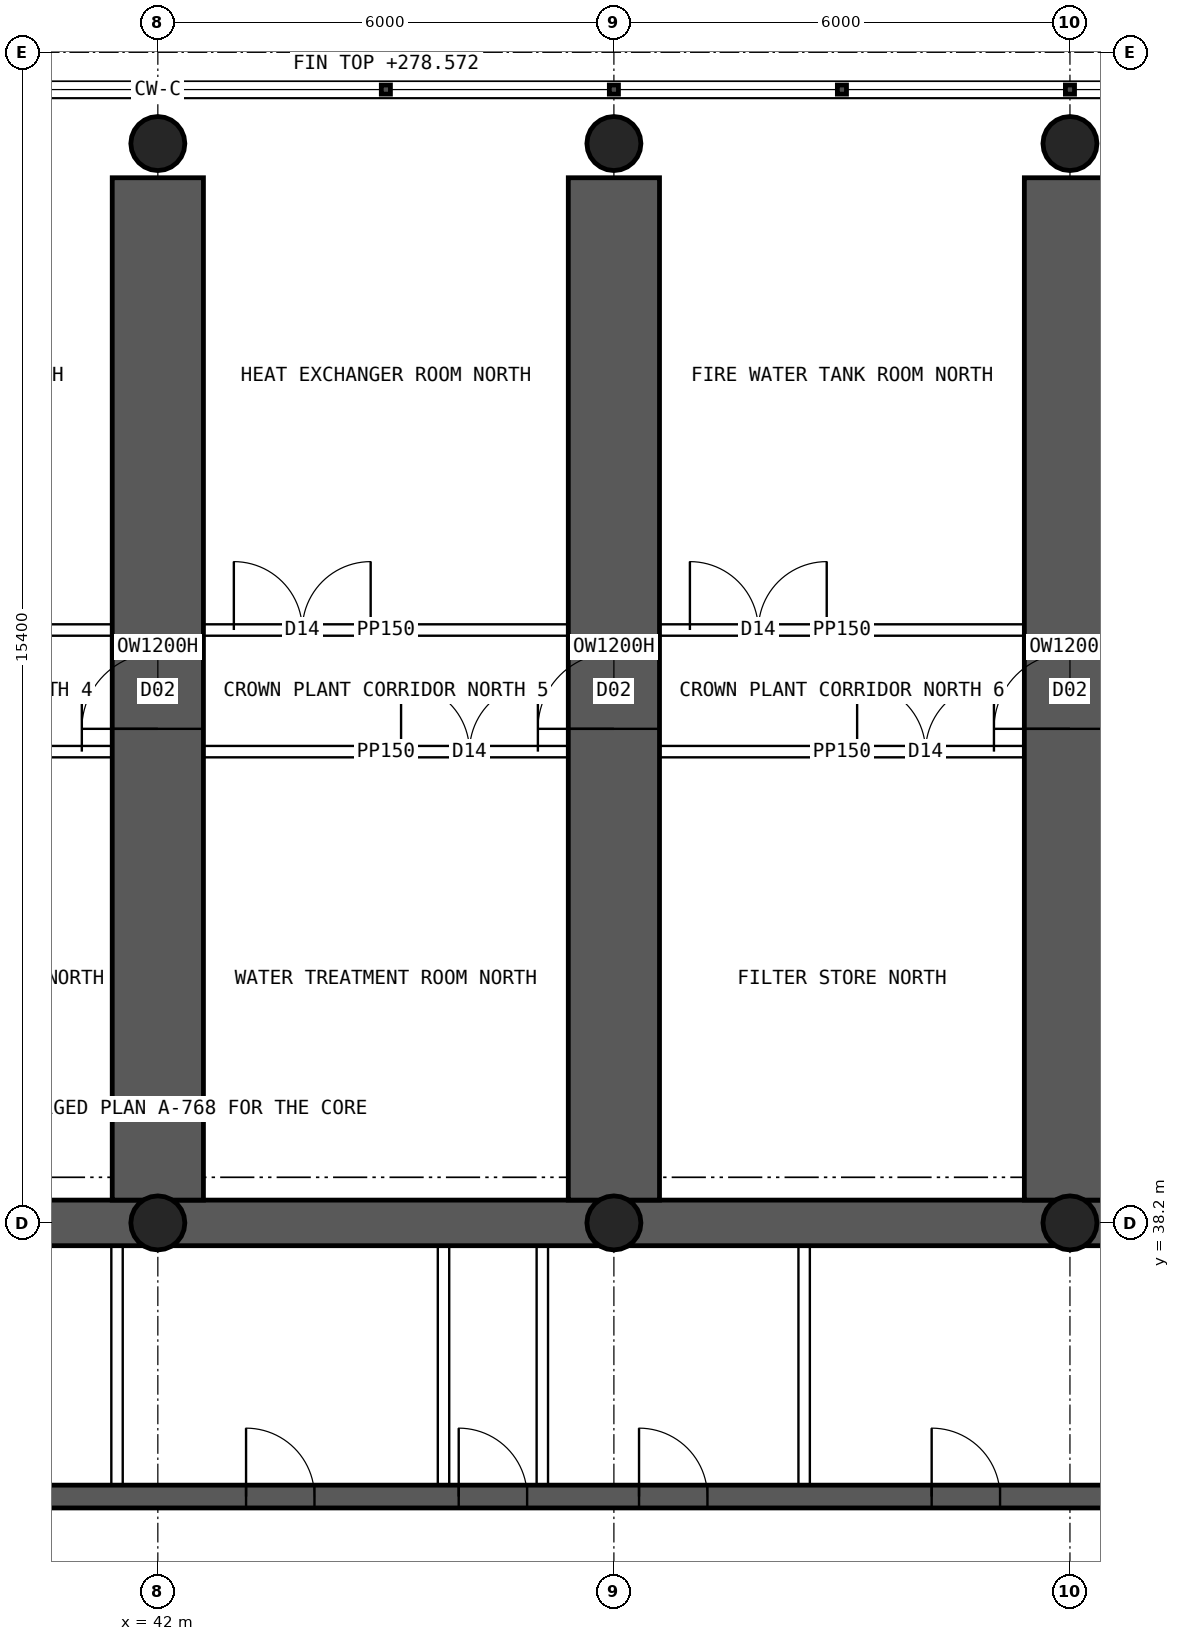
"""IFC4 building model, lengths in metres.
Left out: names, types, materials, properties, quantities, classifications, styles, units other than length and angle.
Written with IfcOpenShell. Run it as: python <this file> out.ifc"""

import sys

from ifc_helpers import new_model, si_unit, direction, frame, frame_2d, origin, origin_2d, place, context, subcontext, project, spatial, rectangle, hollow_circle, extrude, element, fill, save


model = new_model("IFC4")
c1 = context("Model", 3, precision=1e-05, world=origin(), true_north=direction((0.0, 1.0)))
c2 = subcontext(c1, "Body", "Model", "MODEL_VIEW")
j1 = project(units=[si_unit("LENGTHUNIT", "METRE"), si_unit("PLANEANGLEUNIT", "RADIAN")], contexts=[c1])
p1 = place(None, origin())
s1 = spatial("IfcSite", under=j1, at=p1, CompositionType="ELEMENT")
p2 = place(p1, origin())
s2 = spatial("IfcBuilding", under=s1, at=p2, CompositionType="ELEMENT")
p3 = place(p2, frame((0.0, 0.0, 262.3)))
s3 = spatial("IfcBuildingStorey", under=s2, at=p3, CompositionType="ELEMENT", Elevation=262.3)
p4 = place(p3, frame((18.0, 38.2, 0.0), z_axis=(0.0, 0.0, 1.0), x_axis=(1.0, 0.0, 0.0)))
e1 = element("IfcWall", 1, at=p4, inside=s3, PredefinedType="SHEAR", context=c2, shape_type="SweptSolid", body=[
    extrude(rectangle(XDim=48.0, YDim=0.6, at=frame_2d((24.0, 0.0))), origin(), (0.0, 0.0, 1.0), 6.0),
])
p5 = place(p3, frame((18.3, 34.6, 0.0), z_axis=(0.0, 0.0, 1.0), x_axis=(1.0, 0.0, 0.0)))
e2 = element("IfcWall", 2, at=p5, inside=s3, PredefinedType="SHEAR", context=c2, shape_type="SweptSolid", body=[
    extrude(rectangle(XDim=47.4, YDim=0.3, at=frame_2d((23.7, 0.0))), origin(), (0.0, 0.0, 1.0), 6.0),
])
p6 = place(p5, frame((0.9, 0.0, 0.0)))
e3 = element("IfcOpeningElement", 3, at=p6, cuts=e2, PredefinedType="OPENING", context=c2, shape_type="SweptSolid", body=[
    extrude(rectangle(XDim=1.1, YDim=2.1, at=frame_2d((0.55, 1.05))), frame((0.0, 0.16, 0.0), z_axis=(0.0, -1.0, 0.0), x_axis=(1.0, 0.0, 0.0)), (0.0, 0.0, 1.0), 0.32),
])
p7 = place(p5, frame((45.4, 0.0, 0.0)))
e4 = element("IfcOpeningElement", 4, at=p7, cuts=e2, PredefinedType="OPENING", context=c2, shape_type="SweptSolid", body=[
    extrude(rectangle(XDim=1.1, YDim=2.1, at=frame_2d((0.55, 1.05))), frame((0.0, 0.16, 0.0), z_axis=(0.0, -1.0, 0.0), x_axis=(1.0, 0.0, 0.0)), (0.0, 0.0, 1.0), 0.32),
])
p8 = place(p5, frame((4.3, 0.0, 0.0)))
e5 = element("IfcOpeningElement", 5, at=p8, cuts=e2, PredefinedType="OPENING", context=c2, shape_type="SweptSolid", body=[
    extrude(rectangle(XDim=0.9, YDim=2.1, at=frame_2d((0.45, 1.05))), frame((0.0, 0.16, 0.0), z_axis=(0.0, -1.0, 0.0), x_axis=(1.0, 0.0, 0.0)), (0.0, 0.0, 1.0), 0.32),
])
p9 = place(p5, frame((42.2, 0.0, 0.0)))
e6 = element("IfcOpeningElement", 6, at=p9, cuts=e2, PredefinedType="OPENING", context=c2, shape_type="SweptSolid", body=[
    extrude(rectangle(XDim=0.9, YDim=2.1, at=frame_2d((0.45, 1.05))), frame((0.0, 0.16, 0.0), z_axis=(0.0, -1.0, 0.0), x_axis=(1.0, 0.0, 0.0)), (0.0, 0.0, 1.0), 0.32),
])
p10 = place(p5, frame((9.075, 0.0, 0.0)))
e7 = element("IfcOpeningElement", 7, at=p10, cuts=e2, PredefinedType="OPENING", context=c2, shape_type="SweptSolid", body=[
    extrude(rectangle(XDim=0.9, YDim=2.1, at=frame_2d((0.45, 1.05))), frame((0.0, 0.16, 0.0), z_axis=(0.0, -1.0, 0.0), x_axis=(1.0, 0.0, 0.0)), (0.0, 0.0, 1.0), 0.32),
])
p11 = place(p5, frame((13.049, 0.0, 0.0)))
e8 = element("IfcOpeningElement", 8, at=p11, cuts=e2, PredefinedType="OPENING", context=c2, shape_type="SweptSolid", body=[
    extrude(rectangle(XDim=0.9, YDim=2.1, at=frame_2d((0.45, 1.05))), frame((0.0, 0.16, 0.0), z_axis=(0.0, -1.0, 0.0), x_axis=(1.0, 0.0, 0.0)), (0.0, 0.0, 1.0), 0.32),
])
p12 = place(p5, frame((16.696, 0.0, 0.0)))
e9 = element("IfcOpeningElement", 9, at=p12, cuts=e2, PredefinedType="OPENING", context=c2, shape_type="SweptSolid", body=[
    extrude(rectangle(XDim=0.9, YDim=2.1, at=frame_2d((0.45, 1.05))), frame((0.0, 0.16, 0.0), z_axis=(0.0, -1.0, 0.0), x_axis=(1.0, 0.0, 0.0)), (0.0, 0.0, 1.0), 0.32),
])
p13 = place(p5, frame((20.455, 0.0, 0.0)))
e10 = element("IfcOpeningElement", 10, at=p13, cuts=e2, PredefinedType="OPENING", context=c2, shape_type="SweptSolid", body=[
    extrude(rectangle(XDim=0.9, YDim=2.1, at=frame_2d((0.45, 1.05))), frame((0.0, 0.16, 0.0), z_axis=(0.0, -1.0, 0.0), x_axis=(1.0, 0.0, 0.0)), (0.0, 0.0, 1.0), 0.32),
])
p14 = place(p5, frame((24.861, 0.0, 0.0)))
e11 = element("IfcOpeningElement", 11, at=p14, cuts=e2, PredefinedType="OPENING", context=c2, shape_type="SweptSolid", body=[
    extrude(rectangle(XDim=0.9, YDim=2.1, at=frame_2d((0.45, 1.05))), frame((0.0, 0.16, 0.0), z_axis=(0.0, -1.0, 0.0), x_axis=(1.0, 0.0, 0.0)), (0.0, 0.0, 1.0), 0.32),
])
p15 = place(p5, frame((27.658, 0.0, 0.0)))
e12 = element("IfcOpeningElement", 12, at=p15, cuts=e2, PredefinedType="OPENING", context=c2, shape_type="SweptSolid", body=[
    extrude(rectangle(XDim=0.9, YDim=2.1, at=frame_2d((0.45, 1.05))), frame((0.0, 0.16, 0.0), z_axis=(0.0, -1.0, 0.0), x_axis=(1.0, 0.0, 0.0)), (0.0, 0.0, 1.0), 0.32),
])
p16 = place(p5, frame((30.031, 0.0, 0.0)))
e13 = element("IfcOpeningElement", 13, at=p16, cuts=e2, PredefinedType="OPENING", context=c2, shape_type="SweptSolid", body=[
    extrude(rectangle(XDim=0.9, YDim=2.1, at=frame_2d((0.45, 1.05))), frame((0.0, 0.16, 0.0), z_axis=(0.0, -1.0, 0.0), x_axis=(1.0, 0.0, 0.0)), (0.0, 0.0, 1.0), 0.32),
])
p17 = place(p5, frame((33.881, 0.0, 0.0)))
e14 = element("IfcOpeningElement", 14, at=p17, cuts=e2, PredefinedType="OPENING", context=c2, shape_type="SweptSolid", body=[
    extrude(rectangle(XDim=0.9, YDim=2.1, at=frame_2d((0.45, 1.05))), frame((0.0, 0.16, 0.0), z_axis=(0.0, -1.0, 0.0), x_axis=(1.0, 0.0, 0.0)), (0.0, 0.0, 1.0), 0.32),
])
p18 = place(p5, frame((37.629, 0.0, 0.0)))
e15 = element("IfcOpeningElement", 15, at=p18, cuts=e2, PredefinedType="OPENING", context=c2, shape_type="SweptSolid", body=[
    extrude(rectangle(XDim=0.9, YDim=2.1, at=frame_2d((0.45, 1.05))), frame((0.0, 0.16, 0.0), z_axis=(0.0, -1.0, 0.0), x_axis=(1.0, 0.0, 0.0)), (0.0, 0.0, 1.0), 0.32),
])
p19 = place(p3, frame((42.0, 38.5, 0.0), z_axis=(0.0, 0.0, 1.0), x_axis=(0.0, 1.0, 0.0)))
e16 = element("IfcWall", 16, at=p19, inside=s3, PredefinedType="SHEAR", context=c2, shape_type="SweptSolid", body=[
    extrude(rectangle(XDim=13.45, YDim=1.2, at=frame_2d((6.725, 0.0))), origin(), (0.0, 0.0, 1.0), 4.4),
])
p20 = place(p19, frame((6.2, 0.0, 0.0)))
e17 = element("IfcOpeningElement", 17, at=p20, cuts=e16, PredefinedType="OPENING", context=c2, shape_type="SweptSolid", body=[
    extrude(rectangle(XDim=1.0, YDim=2.1, at=frame_2d((0.5, 1.05))), frame((0.0, 0.61, 0.0), z_axis=(0.0, -1.0, 0.0), x_axis=(1.0, 0.0, 0.0)), (0.0, 0.0, 1.0), 1.22),
])
p21 = place(p3, frame((48.0, 38.5, 0.0), z_axis=(0.0, 0.0, 1.0), x_axis=(0.0, 1.0, 0.0)))
e18 = element("IfcWall", 18, at=p21, inside=s3, PredefinedType="SHEAR", context=c2, shape_type="SweptSolid", body=[
    extrude(rectangle(XDim=13.45, YDim=1.2, at=frame_2d((6.725, 0.0))), origin(), (0.0, 0.0, 1.0), 4.4),
])
p22 = place(p21, frame((6.2, 0.0, 0.0)))
e19 = element("IfcOpeningElement", 19, at=p22, cuts=e18, PredefinedType="OPENING", context=c2, shape_type="SweptSolid", body=[
    extrude(rectangle(XDim=1.0, YDim=2.1, at=frame_2d((0.5, 1.05))), frame((0.0, 0.61, 0.0), z_axis=(0.0, -1.0, 0.0), x_axis=(1.0, 0.0, 0.0)), (0.0, 0.0, 1.0), 1.22),
])
p23 = place(p3, frame((54.0, 38.5, 0.0), z_axis=(0.0, 0.0, 1.0), x_axis=(0.0, 1.0, 0.0)))
e20 = element("IfcWall", 20, at=p23, inside=s3, PredefinedType="SHEAR", context=c2, shape_type="SweptSolid", body=[
    extrude(rectangle(XDim=13.45, YDim=1.2, at=frame_2d((6.725, 0.0))), origin(), (0.0, 0.0, 1.0), 4.4),
])
p24 = place(p23, frame((6.2, 0.0, 0.0)))
e21 = element("IfcOpeningElement", 21, at=p24, cuts=e20, PredefinedType="OPENING", context=c2, shape_type="SweptSolid", body=[
    extrude(rectangle(XDim=1.0, YDim=2.1, at=frame_2d((0.5, 1.05))), frame((0.0, 0.61, 0.0), z_axis=(0.0, -1.0, 0.0), x_axis=(1.0, 0.0, 0.0)), (0.0, 0.0, 1.0), 1.22),
])
p25 = place(p3, frame((42.0, 38.2, 0.0), z_axis=(0.0, 0.0, 1.0), x_axis=(1.0, 0.0, 0.0)))
e22 = element("IfcColumn", 22, at=p25, inside=s3, PredefinedType="COLUMN", context=c2, shape_type="SweptSolid", body=[
    extrude(hollow_circle(Radius=0.355, WallThickness=0.025, at=origin_2d()), origin(), (0.0, 0.0, 1.0), 11.517),
])
p26 = place(p3, frame((42.0, 52.4, 0.0), z_axis=(0.0, 0.0, 1.0), x_axis=(1.0, 0.0, 0.0)))
e23 = element("IfcColumn", 23, at=p26, inside=s3, PredefinedType="COLUMN", context=c2, shape_type="SweptSolid", body=[
    extrude(hollow_circle(Radius=0.355, WallThickness=0.025, at=origin_2d()), origin(), (0.0, 0.0, 1.0), 15.058),
])
p27 = place(p3, frame((48.0, 38.2, 0.0), z_axis=(0.0, 0.0, 1.0), x_axis=(1.0, 0.0, 0.0)))
e24 = element("IfcColumn", 24, at=p27, inside=s3, PredefinedType="COLUMN", context=c2, shape_type="SweptSolid", body=[
    extrude(hollow_circle(Radius=0.355, WallThickness=0.025, at=origin_2d()), origin(), (0.0, 0.0, 1.0), 11.517),
])
p28 = place(p3, frame((48.0, 52.4, 0.0), z_axis=(0.0, 0.0, 1.0), x_axis=(1.0, 0.0, 0.0)))
e25 = element("IfcColumn", 25, at=p28, inside=s3, PredefinedType="COLUMN", context=c2, shape_type="SweptSolid", body=[
    extrude(hollow_circle(Radius=0.355, WallThickness=0.025, at=origin_2d()), origin(), (0.0, 0.0, 1.0), 15.058),
])
p29 = place(p3, frame((54.0, 38.2, 0.0), z_axis=(0.0, 0.0, 1.0), x_axis=(1.0, 0.0, 0.0)))
e26 = element("IfcColumn", 26, at=p29, inside=s3, PredefinedType="COLUMN", context=c2, shape_type="SweptSolid", body=[
    extrude(hollow_circle(Radius=0.355, WallThickness=0.025, at=origin_2d()), origin(), (0.0, 0.0, 1.0), 11.517),
])
p30 = place(p3, frame((54.0, 52.4, 0.0), z_axis=(0.0, 0.0, 1.0), x_axis=(1.0, 0.0, 0.0)))
e27 = element("IfcColumn", 27, at=p30, inside=s3, PredefinedType="COLUMN", context=c2, shape_type="SweptSolid", body=[
    extrude(hollow_circle(Radius=0.355, WallThickness=0.025, at=origin_2d()), origin(), (0.0, 0.0, 1.0), 15.058),
])
for number, where, z_axis, x_axis in (
    (28, (41.463, 34.75, 0.0), (0.0, 0.0, 1.0), (0.0, 1.0, 0.0)),
    (29, (45.758, 34.75, 0.0), (0.0, 0.0, 1.0), (0.0, 1.0, 0.0)),
    (30, (47.058, 34.75, 0.0), (0.0, 0.0, 1.0), (0.0, 1.0, 0.0)),
    (31, (50.503, 34.75, 0.0), (0.0, 0.0, 1.0), (0.0, 1.0, 0.0)),
):
    element("IfcWall", number, at=place(p3, frame(where, z_axis=z_axis, x_axis=x_axis)), inside=s3, PredefinedType="SOLIDWALL", context=c2, shape_type="SweptSolid", body=[
        extrude(rectangle(XDim=3.15, YDim=0.15, at=frame_2d((1.575, 0.0))), origin(), (0.0, 0.0, 1.0), 6.0),
    ])
p31 = place(p3, frame((36.6, 46.0, 0.0), z_axis=(0.0, 0.0, 1.0), x_axis=(1.0, 0.0, 0.0)))
e32 = element("IfcWall", 32, at=p31, inside=s3, PredefinedType="PARTITIONING", context=c2, shape_type="SweptSolid", body=[
    extrude(rectangle(XDim=4.8, YDim=0.15, at=frame_2d((2.4, 0.0))), origin(), (0.0, 0.0, 1.0), 6.0),
])
p32 = place(p31, frame((0.4, 0.0, 0.0)))
e33 = element("IfcOpeningElement", 33, at=p32, cuts=e32, PredefinedType="OPENING", context=c2, shape_type="SweptSolid", body=[
    extrude(rectangle(XDim=1.8, YDim=2.4, at=frame_2d((0.9, 1.2))), frame((0.0, 0.085, 0.0), z_axis=(0.0, -1.0, 0.0), x_axis=(1.0, 0.0, 0.0)), (0.0, 0.0, 1.0), 0.17),
])
p33 = place(p3, frame((36.6, 44.4, 0.0), z_axis=(0.0, 0.0, 1.0), x_axis=(1.0, 0.0, 0.0)))
e34 = element("IfcWall", 34, at=p33, inside=s3, PredefinedType="PARTITIONING", context=c2, shape_type="SweptSolid", body=[
    extrude(rectangle(XDim=4.8, YDim=0.15, at=frame_2d((2.4, 0.0))), origin(), (0.0, 0.0, 1.0), 6.0),
])
p34 = place(p33, frame((2.6, 0.0, 0.0)))
e35 = element("IfcOpeningElement", 35, at=p34, cuts=e34, PredefinedType="OPENING", context=c2, shape_type="SweptSolid", body=[
    extrude(rectangle(XDim=1.8, YDim=2.4, at=frame_2d((0.9, 1.2))), frame((0.0, 0.085, 0.0), z_axis=(0.0, -1.0, 0.0), x_axis=(1.0, 0.0, 0.0)), (0.0, 0.0, 1.0), 0.17),
])
p35 = place(p3, frame((42.6, 46.0, 0.0), z_axis=(0.0, 0.0, 1.0), x_axis=(1.0, 0.0, 0.0)))
e36 = element("IfcWall", 36, at=p35, inside=s3, PredefinedType="PARTITIONING", context=c2, shape_type="SweptSolid", body=[
    extrude(rectangle(XDim=4.8, YDim=0.15, at=frame_2d((2.4, 0.0))), origin(), (0.0, 0.0, 1.0), 6.0),
])
p36 = place(p35, frame((0.4, 0.0, 0.0)))
e37 = element("IfcOpeningElement", 37, at=p36, cuts=e36, PredefinedType="OPENING", context=c2, shape_type="SweptSolid", body=[
    extrude(rectangle(XDim=1.8, YDim=2.4, at=frame_2d((0.9, 1.2))), frame((0.0, 0.085, 0.0), z_axis=(0.0, -1.0, 0.0), x_axis=(1.0, 0.0, 0.0)), (0.0, 0.0, 1.0), 0.17),
])
p37 = place(p3, frame((42.6, 44.4, 0.0), z_axis=(0.0, 0.0, 1.0), x_axis=(1.0, 0.0, 0.0)))
e38 = element("IfcWall", 38, at=p37, inside=s3, PredefinedType="PARTITIONING", context=c2, shape_type="SweptSolid", body=[
    extrude(rectangle(XDim=4.8, YDim=0.15, at=frame_2d((2.4, 0.0))), origin(), (0.0, 0.0, 1.0), 6.0),
])
p38 = place(p37, frame((2.6, 0.0, 0.0)))
e39 = element("IfcOpeningElement", 39, at=p38, cuts=e38, PredefinedType="OPENING", context=c2, shape_type="SweptSolid", body=[
    extrude(rectangle(XDim=1.8, YDim=2.4, at=frame_2d((0.9, 1.2))), frame((0.0, 0.085, 0.0), z_axis=(0.0, -1.0, 0.0), x_axis=(1.0, 0.0, 0.0)), (0.0, 0.0, 1.0), 0.17),
])
p39 = place(p3, frame((48.6, 46.0, 0.0), z_axis=(0.0, 0.0, 1.0), x_axis=(1.0, 0.0, 0.0)))
e40 = element("IfcWall", 40, at=p39, inside=s3, PredefinedType="PARTITIONING", context=c2, shape_type="SweptSolid", body=[
    extrude(rectangle(XDim=4.8, YDim=0.15, at=frame_2d((2.4, 0.0))), origin(), (0.0, 0.0, 1.0), 6.0),
])
p40 = place(p39, frame((0.4, 0.0, 0.0)))
e41 = element("IfcOpeningElement", 41, at=p40, cuts=e40, PredefinedType="OPENING", context=c2, shape_type="SweptSolid", body=[
    extrude(rectangle(XDim=1.8, YDim=2.4, at=frame_2d((0.9, 1.2))), frame((0.0, 0.085, 0.0), z_axis=(0.0, -1.0, 0.0), x_axis=(1.0, 0.0, 0.0)), (0.0, 0.0, 1.0), 0.17),
])
p41 = place(p3, frame((48.6, 44.4, 0.0), z_axis=(0.0, 0.0, 1.0), x_axis=(1.0, 0.0, 0.0)))
e42 = element("IfcWall", 42, at=p41, inside=s3, PredefinedType="PARTITIONING", context=c2, shape_type="SweptSolid", body=[
    extrude(rectangle(XDim=4.8, YDim=0.15, at=frame_2d((2.4, 0.0))), origin(), (0.0, 0.0, 1.0), 6.0),
])
p42 = place(p41, frame((2.6, 0.0, 0.0)))
e43 = element("IfcOpeningElement", 43, at=p42, cuts=e42, PredefinedType="OPENING", context=c2, shape_type="SweptSolid", body=[
    extrude(rectangle(XDim=1.8, YDim=2.4, at=frame_2d((0.9, 1.2))), frame((0.0, 0.085, 0.0), z_axis=(0.0, -1.0, 0.0), x_axis=(1.0, 0.0, 0.0)), (0.0, 0.0, 1.0), 0.17),
])
p43 = place(p14, origin())
e44 = element("IfcDoor", 44, at=p43, inside=s3, OperationType="SINGLE_SWING_LEFT", PredefinedType="DOOR", context=c2, shape_type="SweptSolid", body=[
    extrude(rectangle(XDim=0.9, YDim=2.1, at=frame_2d((0.45, 1.05))), frame((0.0, 0.025, 0.0), z_axis=(0.0, -1.0, 0.0), x_axis=(1.0, 0.0, 0.0)), (0.0, 0.0, 1.0), 0.05),
])
fill(e11, e44)
p44 = place(p15, origin())
e45 = element("IfcDoor", 45, at=p44, inside=s3, OperationType="SINGLE_SWING_LEFT", PredefinedType="DOOR", context=c2, shape_type="SweptSolid", body=[
    extrude(rectangle(XDim=0.9, YDim=2.1, at=frame_2d((0.45, 1.05))), frame((0.0, 0.025, 0.0), z_axis=(0.0, -1.0, 0.0), x_axis=(1.0, 0.0, 0.0)), (0.0, 0.0, 1.0), 0.05),
])
fill(e12, e45)
p45 = place(p16, origin())
e46 = element("IfcDoor", 46, at=p45, inside=s3, OperationType="SINGLE_SWING_LEFT", PredefinedType="DOOR", context=c2, shape_type="SweptSolid", body=[
    extrude(rectangle(XDim=0.9, YDim=2.1, at=frame_2d((0.45, 1.05))), frame((0.0, 0.025, 0.0), z_axis=(0.0, -1.0, 0.0), x_axis=(1.0, 0.0, 0.0)), (0.0, 0.0, 1.0), 0.05),
])
fill(e13, e46)
p46 = place(p17, origin())
e47 = element("IfcDoor", 47, at=p46, inside=s3, OperationType="SINGLE_SWING_LEFT", PredefinedType="DOOR", context=c2, shape_type="SweptSolid", body=[
    extrude(rectangle(XDim=0.9, YDim=2.1, at=frame_2d((0.45, 1.05))), frame((0.0, 0.025, 0.0), z_axis=(0.0, -1.0, 0.0), x_axis=(1.0, 0.0, 0.0)), (0.0, 0.0, 1.0), 0.05),
])
fill(e14, e47)
p47 = place(p20, origin())
e48 = element("IfcDoor", 48, at=p47, inside=s3, OperationType="SINGLE_SWING_LEFT", PredefinedType="DOOR", context=c2, shape_type="SweptSolid", body=[
    extrude(rectangle(XDim=1.0, YDim=2.1, at=frame_2d((0.5, 1.05))), frame((0.0, 0.025, 0.0), z_axis=(0.0, -1.0, 0.0), x_axis=(1.0, 0.0, 0.0)), (0.0, 0.0, 1.0), 0.05),
])
fill(e17, e48)
p48 = place(p22, origin())
e49 = element("IfcDoor", 49, at=p48, inside=s3, OperationType="SINGLE_SWING_LEFT", PredefinedType="DOOR", context=c2, shape_type="SweptSolid", body=[
    extrude(rectangle(XDim=1.0, YDim=2.1, at=frame_2d((0.5, 1.05))), frame((0.0, 0.025, 0.0), z_axis=(0.0, -1.0, 0.0), x_axis=(1.0, 0.0, 0.0)), (0.0, 0.0, 1.0), 0.05),
])
fill(e19, e49)
p49 = place(p24, origin())
e50 = element("IfcDoor", 50, at=p49, inside=s3, OperationType="SINGLE_SWING_LEFT", PredefinedType="DOOR", context=c2, shape_type="SweptSolid", body=[
    extrude(rectangle(XDim=1.0, YDim=2.1, at=frame_2d((0.5, 1.05))), frame((0.0, 0.025, 0.0), z_axis=(0.0, -1.0, 0.0), x_axis=(1.0, 0.0, 0.0)), (0.0, 0.0, 1.0), 0.05),
])
fill(e21, e50)
p50 = place(p34, origin())
e51 = element("IfcDoor", 51, at=p50, inside=s3, OperationType="DOUBLE_DOOR_SINGLE_SWING", PredefinedType="DOOR", context=c2, shape_type="SweptSolid", body=[
    extrude(rectangle(XDim=1.8, YDim=2.4, at=frame_2d((0.9, 1.2))), frame((0.0, 0.025, 0.0), z_axis=(0.0, -1.0, 0.0), x_axis=(1.0, 0.0, 0.0)), (0.0, 0.0, 1.0), 0.05),
])
fill(e35, e51)
p51 = place(p36, origin())
e52 = element("IfcDoor", 52, at=p51, inside=s3, OperationType="DOUBLE_DOOR_SINGLE_SWING", PredefinedType="DOOR", context=c2, shape_type="SweptSolid", body=[
    extrude(rectangle(XDim=1.8, YDim=2.4, at=frame_2d((0.9, 1.2))), frame((0.0, 0.025, 0.0), z_axis=(0.0, -1.0, 0.0), x_axis=(1.0, 0.0, 0.0)), (0.0, 0.0, 1.0), 0.05),
])
fill(e37, e52)
p52 = place(p38, origin())
e53 = element("IfcDoor", 53, at=p52, inside=s3, OperationType="DOUBLE_DOOR_SINGLE_SWING", PredefinedType="DOOR", context=c2, shape_type="SweptSolid", body=[
    extrude(rectangle(XDim=1.8, YDim=2.4, at=frame_2d((0.9, 1.2))), frame((0.0, 0.025, 0.0), z_axis=(0.0, -1.0, 0.0), x_axis=(1.0, 0.0, 0.0)), (0.0, 0.0, 1.0), 0.05),
])
fill(e39, e53)
p53 = place(p40, origin())
e54 = element("IfcDoor", 54, at=p53, inside=s3, OperationType="DOUBLE_DOOR_SINGLE_SWING", PredefinedType="DOOR", context=c2, shape_type="SweptSolid", body=[
    extrude(rectangle(XDim=1.8, YDim=2.4, at=frame_2d((0.9, 1.2))), frame((0.0, 0.025, 0.0), z_axis=(0.0, -1.0, 0.0), x_axis=(1.0, 0.0, 0.0)), (0.0, 0.0, 1.0), 0.05),
])
fill(e41, e54)
p54 = place(p42, origin())
e55 = element("IfcDoor", 55, at=p54, inside=s3, OperationType="DOUBLE_DOOR_SINGLE_SWING", PredefinedType="DOOR", context=c2, shape_type="SweptSolid", body=[
    extrude(rectangle(XDim=1.8, YDim=2.4, at=frame_2d((0.9, 1.2))), frame((0.0, 0.025, 0.0), z_axis=(0.0, -1.0, 0.0), x_axis=(1.0, 0.0, 0.0)), (0.0, 0.0, 1.0), 0.05),
])
fill(e43, e55)
save(model, sys.argv[1])
